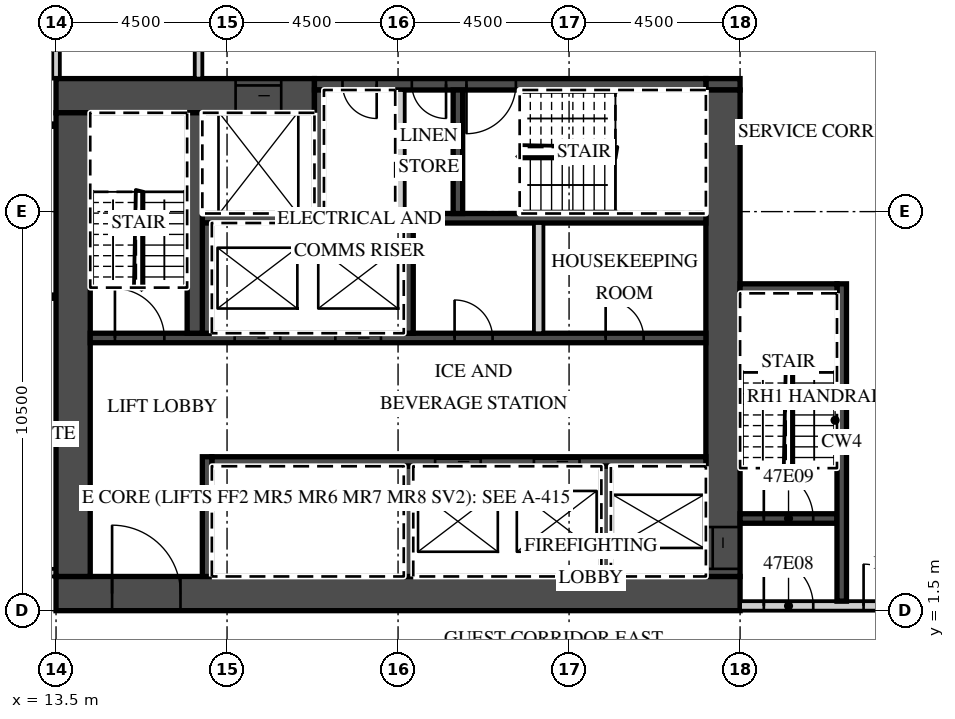
"""IFC4 building model, lengths in metres.
Left out: names, types, materials, properties, quantities, classifications, styles, units other than length and angle.
Written with IfcOpenShell. Run it as: python <this file> out.ifc"""

import sys

from ifc_helpers import new_model, si_unit, direction, frame, frame_2d, origin, place, context, subcontext, project, spatial, rectangle, extrude, element, fill, save


model = new_model("IFC4")
c1 = context("Model", 3, precision=1e-05, world=origin(), true_north=direction((0.0, 1.0)))
c2 = subcontext(c1, "Body", "Model", "MODEL_VIEW")
j1 = project(units=[si_unit("LENGTHUNIT", "METRE"), si_unit("PLANEANGLEUNIT", "RADIAN")], contexts=[c1])
p1 = place(None, origin())
s1 = spatial("IfcSite", under=j1, at=p1, CompositionType="ELEMENT")
p2 = place(p1, origin())
s2 = spatial("IfcBuilding", under=s1, at=p2, CompositionType="ELEMENT")
p3 = place(p2, frame((0.0, 0.0, 196.6)))
s3 = spatial("IfcBuildingStorey", under=s2, at=p3, CompositionType="ELEMENT", Elevation=196.6)
p4 = place(p3, frame((13.5, 15.5, 0.0), z_axis=(0.0, 0.0, 1.0), x_axis=(0.0, 1.0, 0.0)))
e1 = element("IfcWall", 1, at=p4, inside=s3, PredefinedType="PARTITIONING", context=c2, shape_type="SweptSolid", body=[
    extrude(rectangle(XDim=6.089, YDim=0.2, at=frame_2d((3.044, 0.0))), origin(), (0.0, 0.0, 1.0), 3.02),
])
p5 = place(p3, frame((-13.5, 2.5, 0.0), z_axis=(0.0, 0.0, 1.0), x_axis=(1.0, 0.0, 0.0)))
e2 = element("IfcWall", 2, at=p5, inside=s3, PredefinedType="PARTITIONING", context=c2, shape_type="SweptSolid", body=[
    extrude(rectangle(XDim=27.0, YDim=0.2, at=frame_2d((13.5, 0.0))), origin(), (0.0, 0.0, 1.0), 3.02),
])
p6 = place(p5, frame((0.575, 0.0, 0.0)))
e3 = element("IfcOpeningElement", 3, at=p6, cuts=e2, PredefinedType="OPENING", context=c2, shape_type="SweptSolid", body=[
    extrude(rectangle(XDim=1.0, YDim=2.1, at=frame_2d((0.5, 1.05))), frame((0.0, 0.11, 0.0), z_axis=(0.0, -1.0, 0.0), x_axis=(1.0, 0.0, 0.0)), (0.0, 0.0, 1.0), 0.22),
])
p7 = place(p5, frame((9.863, 0.0, 0.0)))
e4 = element("IfcOpeningElement", 4, at=p7, cuts=e2, PredefinedType="OPENING", context=c2, shape_type="SweptSolid", body=[
    extrude(rectangle(XDim=1.2, YDim=2.1, at=frame_2d((0.6, 1.05))), frame((0.0, 0.11, 0.0), z_axis=(0.0, -1.0, 0.0), x_axis=(1.0, 0.0, 0.0)), (0.0, 0.0, 1.0), 0.22),
])
p8 = place(p5, frame((14.075, 0.0, 0.0)))
e5 = element("IfcOpeningElement", 5, at=p8, cuts=e2, PredefinedType="OPENING", context=c2, shape_type="SweptSolid", body=[
    extrude(rectangle(XDim=1.0, YDim=2.1, at=frame_2d((0.5, 1.05))), frame((0.0, 0.11, 0.0), z_axis=(0.0, -1.0, 0.0), x_axis=(1.0, 0.0, 0.0)), (0.0, 0.0, 1.0), 0.22),
])
p9 = place(p5, frame((18.55, 0.0, 0.0)))
e6 = element("IfcOpeningElement", 6, at=p9, cuts=e2, PredefinedType="OPENING", context=c2, shape_type="SweptSolid", body=[
    extrude(rectangle(XDim=1.0, YDim=2.1, at=frame_2d((0.5, 1.05))), frame((0.0, 0.11, 0.0), z_axis=(0.0, -1.0, 0.0), x_axis=(1.0, 0.0, 0.0)), (0.0, 0.0, 1.0), 0.22),
])
p10 = place(p5, frame((23.075, 0.0, 0.0)))
e7 = element("IfcOpeningElement", 7, at=p10, cuts=e2, PredefinedType="OPENING", context=c2, shape_type="SweptSolid", body=[
    extrude(rectangle(XDim=1.0, YDim=2.1, at=frame_2d((0.5, 1.05))), frame((0.0, 0.11, 0.0), z_axis=(0.0, -1.0, 0.0), x_axis=(1.0, 0.0, 0.0)), (0.0, 0.0, 1.0), 0.22),
])
p11 = place(p3, frame((13.5, 1.95, 0.0), z_axis=(0.0, 0.0, 1.0), x_axis=(1.0, 0.0, 0.0)))
e8 = element("IfcWall", 8, at=p11, inside=s3, PredefinedType="SHEAR", context=c2, shape_type="SweptSolid", body=[
    extrude(rectangle(XDim=18.0, YDim=0.9, at=frame_2d((9.0, 0.0))), origin(), (0.0, 0.0, 1.0), 3.02),
])
p12 = place(p11, frame((1.475, 0.0, 0.0)))
e9 = element("IfcOpeningElement", 9, at=p12, cuts=e8, PredefinedType="OPENING", context=c2, shape_type="SweptSolid", body=[
    extrude(rectangle(XDim=1.8, YDim=2.1, at=frame_2d((0.9, 1.05))), frame((0.0, 0.46, 0.0), z_axis=(0.0, -1.0, 0.0), x_axis=(1.0, 0.0, 0.0)), (0.0, 0.0, 1.0), 0.92),
])
p13 = place(p3, frame((13.5, 15.05, 0.0), z_axis=(0.0, 0.0, 1.0), x_axis=(1.0, 0.0, 0.0)))
e10 = element("IfcWall", 10, at=p13, inside=s3, PredefinedType="SHEAR", context=c2, shape_type="SweptSolid", body=[
    extrude(rectangle(XDim=6.8, YDim=0.9, at=frame_2d((3.4, 0.0))), origin(), (0.0, 0.0, 1.0), 3.02),
])
p14 = place(p13, frame((4.725, 0.0, 0.0)))
e11 = element("IfcOpeningElement", 11, at=p14, cuts=e10, PredefinedType="OPENING", context=c2, shape_type="SweptSolid", body=[
    extrude(rectangle(XDim=1.2, YDim=2.1, at=frame_2d((0.6, 1.05))), frame((0.0, 0.46, 0.0), z_axis=(0.0, -1.0, 0.0), x_axis=(1.0, 0.0, 0.0)), (0.0, 0.0, 1.0), 0.92),
])
p15 = place(p3, frame((30.6, 15.35, 0.0), z_axis=(0.0, 0.0, 1.0), x_axis=(1.0, 0.0, 0.0)))
e12 = element("IfcWall", 12, at=p15, inside=s3, PredefinedType="SHEAR", context=c2, shape_type="SweptSolid", body=[
    extrude(rectangle(XDim=0.9, YDim=0.3, at=frame_2d((0.45, 0.0))), origin(), (0.0, 0.0, 1.0), 3.02),
])
p16 = place(p3, frame((20.3, 15.35, 0.0), z_axis=(0.0, 0.0, 1.0), x_axis=(1.0, 0.0, 0.0)))
e13 = element("IfcWall", 13, at=p16, inside=s3, PredefinedType="SHEAR", context=c2, shape_type="SweptSolid", body=[
    extrude(rectangle(XDim=10.3, YDim=0.3, at=frame_2d((5.15, 0.0))), origin(), (0.0, 0.0, 1.0), 3.02),
])
p17 = place(p16, frame((4.0, 0.0, 0.0)))
e14 = element("IfcOpeningElement", 14, at=p17, cuts=e13, PredefinedType="OPENING", context=c2, shape_type="SweptSolid", body=[
    extrude(rectangle(XDim=1.3, YDim=2.1, at=frame_2d((0.65, 1.05))), frame((0.0, 0.16, 0.0), z_axis=(0.0, -1.0, 0.0), x_axis=(1.0, 0.0, 0.0)), (0.0, 0.0, 1.0), 0.32),
])
p18 = place(p16, frame((2.562, 0.0, 0.0)))
e15 = element("IfcOpeningElement", 15, at=p18, cuts=e13, PredefinedType="OPENING", context=c2, shape_type="SweptSolid", body=[
    extrude(rectangle(XDim=0.9, YDim=2.1, at=frame_2d((0.45, 1.05))), frame((0.0, 0.16, 0.0), z_axis=(0.0, -1.0, 0.0), x_axis=(1.0, 0.0, 0.0)), (0.0, 0.0, 1.0), 0.32),
])
p19 = place(p16, frame((0.738, 0.0, 0.0)))
e16 = element("IfcOpeningElement", 16, at=p19, cuts=e13, PredefinedType="OPENING", context=c2, shape_type="SweptSolid", body=[
    extrude(rectangle(XDim=0.9, YDim=2.1, at=frame_2d((0.45, 1.05))), frame((0.0, 0.16, 0.0), z_axis=(0.0, -1.0, 0.0), x_axis=(1.0, 0.0, 0.0)), (0.0, 0.0, 1.0), 0.32),
])
p20 = place(p3, frame((31.05, 2.4, 0.0), z_axis=(0.0, 0.0, 1.0), x_axis=(0.0, 1.0, 0.0)))
e17 = element("IfcWall", 17, at=p20, inside=s3, PredefinedType="SHEAR", context=c2, shape_type="SweptSolid", body=[
    extrude(rectangle(XDim=12.8, YDim=0.9, at=frame_2d((6.4, 0.0))), origin(), (0.0, 0.0, 1.0), 3.02),
])
p21 = place(p20, frame((0.2, 0.0, 0.0)))
e18 = element("IfcOpeningElement", 18, at=p21, cuts=e17, PredefinedType="OPENING", context=c2, shape_type="SweptSolid", body=[
    extrude(rectangle(XDim=1.1, YDim=2.1, at=frame_2d((0.55, 1.05))), frame((0.0, 0.46, 0.0), z_axis=(0.0, -1.0, 0.0), x_axis=(1.0, 0.0, 0.0)), (0.0, 0.0, 1.0), 0.92),
])
p22 = place(p3, frame((13.95, 2.4, 0.0), z_axis=(0.0, 0.0, 1.0), x_axis=(0.0, 1.0, 0.0)))
e19 = element("IfcWall", 19, at=p22, inside=s3, PredefinedType="SHEAR", context=c2, shape_type="SweptSolid", body=[
    extrude(rectangle(XDim=12.2, YDim=0.9, at=frame_2d((6.1, 0.0))), origin(), (0.0, 0.0, 1.0), 3.02),
])
p23 = place(p3, frame((17.6, 5.425, 0.0), z_axis=(0.0, 0.0, 1.0), x_axis=(1.0, 0.0, 0.0)))
e20 = element("IfcWall", 20, at=p23, inside=s3, PredefinedType="SHEAR", context=c2, shape_type="SweptSolid", body=[
    extrude(rectangle(XDim=13.0, YDim=0.25, at=frame_2d((6.5, 0.0))), origin(), (0.0, 0.0, 1.0), 3.02),
])
p24 = place(p23, frame((8.475, 0.0, 0.0)))
e21 = element("IfcOpeningElement", 21, at=p24, cuts=e20, PredefinedType="OPENING", context=c2, shape_type="SweptSolid", body=[
    extrude(rectangle(XDim=1.2, YDim=2.1, at=frame_2d((0.6, 1.05))), frame((0.0, 0.135, 0.0), z_axis=(0.0, -1.0, 0.0), x_axis=(1.0, 0.0, 0.0)), (0.0, 0.0, 1.0), 0.27),
])
p25 = place(p23, frame((5.875, 0.0, 0.0)))
e22 = element("IfcOpeningElement", 22, at=p25, cuts=e20, PredefinedType="OPENING", context=c2, shape_type="SweptSolid", body=[
    extrude(rectangle(XDim=1.2, YDim=2.1, at=frame_2d((0.6, 1.05))), frame((0.0, 0.135, 0.0), z_axis=(0.0, -1.0, 0.0), x_axis=(1.0, 0.0, 0.0)), (0.0, 0.0, 1.0), 0.27),
])
p26 = place(p3, frame((17.475, 2.4, 0.0), z_axis=(0.0, 0.0, 1.0), x_axis=(0.0, 1.0, 0.0)))
e23 = element("IfcWall", 23, at=p26, inside=s3, PredefinedType="SHEAR", context=c2, shape_type="SweptSolid", body=[
    extrude(rectangle(XDim=3.15, YDim=0.25, at=frame_2d((1.575, 0.0))), origin(), (0.0, 0.0, 1.0), 3.02),
])
for number, where, z_axis, x_axis in (
    (24, (27.975, 2.4, 0.0), (0.0, 0.0, 1.0), (0.0, 1.0, 0.0)),
    (25, (22.775, 2.4, 0.0), (0.0, 0.0, 1.0), (0.0, 1.0, 0.0)),
):
    element("IfcWall", number, at=place(p3, frame(where, z_axis=z_axis, x_axis=x_axis)), inside=s3, PredefinedType="SHEAR", context=c2, shape_type="SweptSolid", body=[
        extrude(rectangle(XDim=2.9, YDim=0.25, at=frame_2d((1.45, 0.0))), origin(), (0.0, 0.0, 1.0), 3.02),
    ])
p27 = place(p3, frame((14.4, 8.675, 0.0), z_axis=(0.0, 0.0, 1.0), x_axis=(1.0, 0.0, 0.0)))
e26 = element("IfcWall", 26, at=p27, inside=s3, PredefinedType="SHEAR", context=c2, shape_type="SweptSolid", body=[
    extrude(rectangle(XDim=16.2, YDim=0.25, at=frame_2d((8.1, 0.0))), origin(), (0.0, 0.0, 1.0), 3.02),
])
p28 = place(p27, frame((6.45, 0.0, 0.0)))
e27 = element("IfcOpeningElement", 27, at=p28, cuts=e26, PredefinedType="OPENING", context=c2, shape_type="SweptSolid", body=[
    extrude(rectangle(XDim=1.2, YDim=2.1, at=frame_2d((0.6, 1.05))), frame((0.0, 0.135, 0.0), z_axis=(0.0, -1.0, 0.0), x_axis=(1.0, 0.0, 0.0)), (0.0, 0.0, 1.0), 0.27),
])
p29 = place(p27, frame((3.8, 0.0, 0.0)))
e28 = element("IfcOpeningElement", 28, at=p29, cuts=e26, PredefinedType="OPENING", context=c2, shape_type="SweptSolid", body=[
    extrude(rectangle(XDim=1.2, YDim=2.1, at=frame_2d((0.6, 1.05))), frame((0.0, 0.135, 0.0), z_axis=(0.0, -1.0, 0.0), x_axis=(1.0, 0.0, 0.0)), (0.0, 0.0, 1.0), 0.27),
])
p30 = place(p27, frame((0.65, 0.0, 0.0)))
e29 = element("IfcOpeningElement", 29, at=p30, cuts=e26, PredefinedType="OPENING", context=c2, shape_type="SweptSolid", body=[
    extrude(rectangle(XDim=1.3, YDim=2.1, at=frame_2d((0.65, 1.05))), frame((0.0, 0.135, 0.0), z_axis=(0.0, -1.0, 0.0), x_axis=(1.0, 0.0, 0.0)), (0.0, 0.0, 1.0), 0.27),
])
p31 = place(p27, frame((13.562, 0.0, 0.0)))
e30 = element("IfcOpeningElement", 30, at=p31, cuts=e26, PredefinedType="OPENING", context=c2, shape_type="SweptSolid", body=[
    extrude(rectangle(XDim=1.0, YDim=2.1, at=frame_2d((0.5, 1.05))), frame((0.0, 0.135, 0.0), z_axis=(0.0, -1.0, 0.0), x_axis=(1.0, 0.0, 0.0)), (0.0, 0.0, 1.0), 0.27),
])
p32 = place(p27, frame((9.587, 0.0, 0.0)))
e31 = element("IfcOpeningElement", 31, at=p32, cuts=e26, PredefinedType="OPENING", context=c2, shape_type="SweptSolid", body=[
    extrude(rectangle(XDim=1.0, YDim=2.1, at=frame_2d((0.5, 1.05))), frame((0.0, 0.135, 0.0), z_axis=(0.0, -1.0, 0.0), x_axis=(1.0, 0.0, 0.0)), (0.0, 0.0, 1.0), 0.27),
])
p33 = place(p3, frame((17.35, 11.825, 0.0), z_axis=(0.0, 0.0, 1.0), x_axis=(1.0, 0.0, 0.0)))
e32 = element("IfcWall", 32, at=p33, inside=s3, PredefinedType="SHEAR", context=c2, shape_type="SweptSolid", body=[
    extrude(rectangle(XDim=13.25, YDim=0.25, at=frame_2d((6.625, 0.0))), origin(), (0.0, 0.0, 1.0), 3.02),
])
for number, where, z_axis, x_axis in (
    (33, (17.475, 8.8, 0.0), (0.0, 0.0, 1.0), (0.0, 1.0, 0.0)),
    (34, (22.775, 8.8, 0.0), (0.0, 0.0, 1.0), (0.0, 1.0, 0.0)),
):
    element("IfcWall", number, at=place(p3, frame(where, z_axis=z_axis, x_axis=x_axis)), inside=s3, PredefinedType="SHEAR", context=c2, shape_type="SweptSolid", body=[
        extrude(rectangle(XDim=2.9, YDim=0.25, at=frame_2d((1.45, 0.0))), origin(), (0.0, 0.0, 1.0), 3.02),
    ])
p34 = place(p3, frame((26.2, 8.8, 0.0), z_axis=(0.0, 0.0, 1.0), x_axis=(0.0, 1.0, 0.0)))
e35 = element("IfcWall", 35, at=p34, inside=s3, PredefinedType="PARTITIONING", context=c2, shape_type="SweptSolid", body=[
    extrude(rectangle(XDim=2.9, YDim=0.25, at=frame_2d((1.45, 0.0))), origin(), (0.0, 0.0, 1.0), 3.02),
])
p35 = place(p3, frame((17.15, 8.8, 0.0), z_axis=(0.0, 0.0, 1.0), x_axis=(0.0, 1.0, 0.0)))
e36 = element("IfcWall", 36, at=p35, inside=s3, PredefinedType="SHEAR", context=c2, shape_type="SweptSolid", body=[
    extrude(rectangle(XDim=5.8, YDim=0.4, at=frame_2d((2.9, 0.0))), origin(), (0.0, 0.0, 1.0), 3.02),
])
for number, where, z_axis, x_axis in (
    (37, (20.425, 11.95, 0.0), (0.0, 0.0, 1.0), (0.0, 1.0, 0.0)),
    (38, (24.075, 11.95, 0.0), (0.0, 0.0, 1.0), (0.0, 1.0, 0.0)),
):
    element("IfcWall", number, at=place(p3, frame(where, z_axis=z_axis, x_axis=x_axis)), inside=s3, PredefinedType="SHEAR", context=c2, shape_type="SweptSolid", body=[
        extrude(rectangle(XDim=3.25, YDim=0.25, at=frame_2d((1.625, 0.0))), origin(), (0.0, 0.0, 1.0), 3.02),
    ])
p36 = place(p3, frame((22.55, 11.95, 0.0), z_axis=(0.0, 0.0, 1.0), x_axis=(0.0, 1.0, 0.0)))
e39 = element("IfcWall", 39, at=p36, inside=s3, PredefinedType="PARTITIONING", context=c2, shape_type="SweptSolid", body=[
    extrude(rectangle(XDim=3.25, YDim=0.25, at=frame_2d((1.625, 0.0))), origin(), (0.0, 0.0, 1.0), 3.02),
])
p37 = place(p3, frame((31.5, 1.625, 0.0), z_axis=(0.0, 0.0, 1.0), x_axis=(1.0, 0.0, 0.0)))
e40 = element("IfcWall", 40, at=p37, inside=s3, PredefinedType="PARTITIONING", context=c2, shape_type="SweptSolid", body=[
    extrude(rectangle(XDim=8.035, YDim=0.25, at=frame_2d((4.018, 0.0))), origin(), (0.0, 0.0, 1.0), 3.02),
])
p38 = place(p37, frame((0.625, 0.0, 0.0)))
e41 = element("IfcOpeningElement", 41, at=p38, cuts=e40, PredefinedType="OPENING", context=c2, shape_type="SweptSolid", body=[
    extrude(rectangle(XDim=1.3, YDim=2.1, at=frame_2d((0.65, 1.05))), frame((0.0, 0.135, 0.0), z_axis=(0.0, -1.0, 0.0), x_axis=(1.0, 0.0, 0.0)), (0.0, 0.0, 1.0), 0.27),
])
p39 = place(p37, frame((3.25, 0.0, 0.0)))
e42 = element("IfcOpeningElement", 42, at=p39, cuts=e40, PredefinedType="OPENING", context=c2, shape_type="SweptSolid", body=[
    extrude(rectangle(XDim=1.1, YDim=2.1, at=frame_2d((0.55, 1.05))), frame((0.0, 0.135, 0.0), z_axis=(0.0, -1.0, 0.0), x_axis=(1.0, 0.0, 0.0)), (0.0, 0.0, 1.0), 0.27),
])
p40 = place(p3, frame((31.5, 3.925, 0.0), z_axis=(0.0, 0.0, 1.0), x_axis=(1.0, 0.0, 0.0)))
e43 = element("IfcWall", 43, at=p40, inside=s3, PredefinedType="SHEAR", context=c2, shape_type="SweptSolid", body=[
    extrude(rectangle(XDim=2.55, YDim=0.25, at=frame_2d((1.275, 0.0))), origin(), (0.0, 0.0, 1.0), 3.02),
])
p41 = place(p40, frame((0.625, 0.0, 0.0)))
e44 = element("IfcOpeningElement", 44, at=p41, cuts=e43, PredefinedType="OPENING", context=c2, shape_type="SweptSolid", body=[
    extrude(rectangle(XDim=1.3, YDim=2.1, at=frame_2d((0.65, 1.05))), frame((0.0, 0.135, 0.0), z_axis=(0.0, -1.0, 0.0), x_axis=(1.0, 0.0, 0.0)), (0.0, 0.0, 1.0), 0.27),
])
p42 = place(p3, frame((34.175, 1.75, 0.0), z_axis=(0.0, 0.0, 1.0), x_axis=(0.0, 1.0, 0.0)))
e45 = element("IfcWall", 45, at=p42, inside=s3, PredefinedType="SHEAR", context=c2, shape_type="SweptSolid", body=[
    extrude(rectangle(XDim=8.35, YDim=0.25, at=frame_2d((4.175, 0.0))), origin(), (0.0, 0.0, 1.0), 3.02),
])
p43 = place(p3, frame((31.5, 9.975, 0.0), z_axis=(0.0, 0.0, 1.0), x_axis=(1.0, 0.0, 0.0)))
e46 = element("IfcWall", 46, at=p43, inside=s3, PredefinedType="SHEAR", context=c2, shape_type="SweptSolid", body=[
    extrude(rectangle(XDim=2.55, YDim=0.25, at=frame_2d((1.275, 0.0))), origin(), (0.0, 0.0, 1.0), 3.02),
])
p44 = place(p3, frame((17.25, 15.5, 0.0), z_axis=(0.0, 0.0, 1.0), x_axis=(0.0, 1.0, 0.0)))
e47 = element("IfcWall", 47, at=p44, inside=s3, PredefinedType="PARTITIONING", context=c2, shape_type="SweptSolid", body=[
    extrude(rectangle(XDim=2.2, YDim=0.2, at=frame_2d((1.1, 0.0))), origin(), (0.0, 0.0, 1.0), 3.02),
])
p45 = place(p28, origin())
e48 = element("IfcDoor", 48, at=p45, inside=s3, OperationType="SLIDING_TO_LEFT", PredefinedType="DOOR", context=c2, shape_type="SweptSolid", body=[
    extrude(rectangle(XDim=1.2, YDim=2.1, at=frame_2d((0.6, 1.05))), frame((0.0, 0.025, 0.0), z_axis=(0.0, -1.0, 0.0), x_axis=(1.0, 0.0, 0.0)), (0.0, 0.0, 1.0), 0.05),
])
fill(e27, e48)
p46 = place(p29, origin())
e49 = element("IfcDoor", 49, at=p46, inside=s3, OperationType="SLIDING_TO_RIGHT", PredefinedType="DOOR", context=c2, shape_type="SweptSolid", body=[
    extrude(rectangle(XDim=1.2, YDim=2.1, at=frame_2d((0.6, 1.05))), frame((0.0, 0.025, 0.0), z_axis=(0.0, -1.0, 0.0), x_axis=(1.0, 0.0, 0.0)), (0.0, 0.0, 1.0), 0.05),
])
fill(e28, e49)
p47 = place(p24, origin())
e50 = element("IfcDoor", 50, at=p47, inside=s3, OperationType="SLIDING_TO_LEFT", PredefinedType="DOOR", context=c2, shape_type="SweptSolid", body=[
    extrude(rectangle(XDim=1.2, YDim=2.1, at=frame_2d((0.6, 1.05))), frame((0.0, 0.025, 0.0), z_axis=(0.0, -1.0, 0.0), x_axis=(1.0, 0.0, 0.0)), (0.0, 0.0, 1.0), 0.05),
])
fill(e21, e50)
p48 = place(p25, origin())
e51 = element("IfcDoor", 51, at=p48, inside=s3, OperationType="SLIDING_TO_RIGHT", PredefinedType="DOOR", context=c2, shape_type="SweptSolid", body=[
    extrude(rectangle(XDim=1.2, YDim=2.1, at=frame_2d((0.6, 1.05))), frame((0.0, 0.025, 0.0), z_axis=(0.0, -1.0, 0.0), x_axis=(1.0, 0.0, 0.0)), (0.0, 0.0, 1.0), 0.05),
])
fill(e22, e51)
p49 = place(p14, origin())
e52 = element("IfcDoor", 52, at=p49, inside=s3, OperationType="SLIDING_TO_LEFT", PredefinedType="DOOR", context=c2, shape_type="SweptSolid", body=[
    extrude(rectangle(XDim=1.2, YDim=2.1, at=frame_2d((0.6, 1.05))), frame((0.0, 0.025, 0.0), z_axis=(0.0, -1.0, 0.0), x_axis=(1.0, 0.0, 0.0)), (0.0, 0.0, 1.0), 0.05),
])
fill(e11, e52)
p50 = place(p21, origin())
e53 = element("IfcDoor", 53, at=p50, inside=s3, OperationType="SLIDING_TO_LEFT", PredefinedType="DOOR", context=c2, shape_type="SweptSolid", body=[
    extrude(rectangle(XDim=1.1, YDim=2.1, at=frame_2d((0.55, 1.05))), frame((0.0, 0.025, 0.0), z_axis=(0.0, -1.0, 0.0), x_axis=(1.0, 0.0, 0.0)), (0.0, 0.0, 1.0), 0.05),
])
fill(e18, e53)
p51 = place(p12, origin())
e54 = element("IfcDoor", 54, at=p51, inside=s3, OperationType="DOUBLE_DOOR_DOUBLE_SWING", PredefinedType="DOOR", context=c2, shape_type="SweptSolid", body=[
    extrude(rectangle(XDim=1.8, YDim=2.1, at=frame_2d((0.9, 1.05))), frame((0.0, 0.025, 0.0), z_axis=(0.0, -1.0, 0.0), x_axis=(1.0, 0.0, 0.0)), (0.0, 0.0, 1.0), 0.05),
])
fill(e9, e54)
p52 = place(p38, origin())
e55 = element("IfcDoor", 55, at=p52, inside=s3, OperationType="SINGLE_SWING_LEFT", PredefinedType="DOOR", context=c2, shape_type="SweptSolid", body=[
    extrude(rectangle(XDim=1.3, YDim=2.1, at=frame_2d((0.65, 1.05))), frame((0.0, 0.025, 0.0), z_axis=(0.0, -1.0, 0.0), x_axis=(1.0, 0.0, 0.0)), (0.0, 0.0, 1.0), 0.05),
])
fill(e41, e55)
p53 = place(p41, origin())
e56 = element("IfcDoor", 56, at=p53, inside=s3, OperationType="SINGLE_SWING_LEFT", PredefinedType="DOOR", context=c2, shape_type="SweptSolid", body=[
    extrude(rectangle(XDim=1.3, YDim=2.1, at=frame_2d((0.65, 1.05))), frame((0.0, 0.025, 0.0), z_axis=(0.0, -1.0, 0.0), x_axis=(1.0, 0.0, 0.0)), (0.0, 0.0, 1.0), 0.05),
])
fill(e44, e56)
p54 = place(p39, origin())
e57 = element("IfcDoor", 57, at=p54, inside=s3, OperationType="SINGLE_SWING_LEFT", PredefinedType="DOOR", context=c2, shape_type="SweptSolid", body=[
    extrude(rectangle(XDim=1.1, YDim=2.1, at=frame_2d((0.55, 1.05))), frame((0.0, 0.025, 0.0), z_axis=(0.0, -1.0, 0.0), x_axis=(1.0, 0.0, 0.0)), (0.0, 0.0, 1.0), 0.05),
])
fill(e42, e57)
p55 = place(p30, origin())
e58 = element("IfcDoor", 58, at=p55, inside=s3, OperationType="SINGLE_SWING_LEFT", PredefinedType="DOOR", context=c2, shape_type="SweptSolid", body=[
    extrude(rectangle(XDim=1.3, YDim=2.1, at=frame_2d((0.65, 1.05))), frame((0.0, 0.025, 0.0), z_axis=(0.0, -1.0, 0.0), x_axis=(1.0, 0.0, 0.0)), (0.0, 0.0, 1.0), 0.05),
])
fill(e29, e58)
p56 = place(p17, origin())
e59 = element("IfcDoor", 59, at=p56, inside=s3, OperationType="SINGLE_SWING_LEFT", PredefinedType="DOOR", context=c2, shape_type="SweptSolid", body=[
    extrude(rectangle(XDim=1.3, YDim=2.1, at=frame_2d((0.65, 1.05))), frame((0.0, 0.025, 0.0), z_axis=(0.0, -1.0, 0.0), x_axis=(1.0, 0.0, 0.0)), (0.0, 0.0, 1.0), 0.05),
])
fill(e14, e59)
p57 = place(p18, origin())
e60 = element("IfcDoor", 60, at=p57, inside=s3, OperationType="SINGLE_SWING_RIGHT", PredefinedType="DOOR", context=c2, shape_type="SweptSolid", body=[
    extrude(rectangle(XDim=0.9, YDim=2.1, at=frame_2d((0.45, 1.05))), frame((0.0, 0.025, 0.0), z_axis=(0.0, -1.0, 0.0), x_axis=(1.0, 0.0, 0.0)), (0.0, 0.0, 1.0), 0.05),
])
fill(e15, e60)
p58 = place(p19, origin())
e61 = element("IfcDoor", 61, at=p58, inside=s3, OperationType="SINGLE_SWING_RIGHT", PredefinedType="DOOR", context=c2, shape_type="SweptSolid", body=[
    extrude(rectangle(XDim=0.9, YDim=2.1, at=frame_2d((0.45, 1.05))), frame((0.0, 0.025, 0.0), z_axis=(0.0, -1.0, 0.0), x_axis=(1.0, 0.0, 0.0)), (0.0, 0.0, 1.0), 0.05),
])
fill(e16, e61)
p59 = place(p31, origin())
e62 = element("IfcDoor", 62, at=p59, inside=s3, OperationType="SINGLE_SWING_LEFT", PredefinedType="DOOR", context=c2, shape_type="SweptSolid", body=[
    extrude(rectangle(XDim=1.0, YDim=2.1, at=frame_2d((0.5, 1.05))), frame((0.0, 0.025, 0.0), z_axis=(0.0, -1.0, 0.0), x_axis=(1.0, 0.0, 0.0)), (0.0, 0.0, 1.0), 0.05),
])
fill(e30, e62)
p60 = place(p32, origin())
e63 = element("IfcDoor", 63, at=p60, inside=s3, OperationType="SINGLE_SWING_LEFT", PredefinedType="DOOR", context=c2, shape_type="SweptSolid", body=[
    extrude(rectangle(XDim=1.0, YDim=2.1, at=frame_2d((0.5, 1.05))), frame((0.0, 0.025, 0.0), z_axis=(0.0, -1.0, 0.0), x_axis=(1.0, 0.0, 0.0)), (0.0, 0.0, 1.0), 0.05),
])
fill(e31, e63)
save(model, sys.argv[1])
